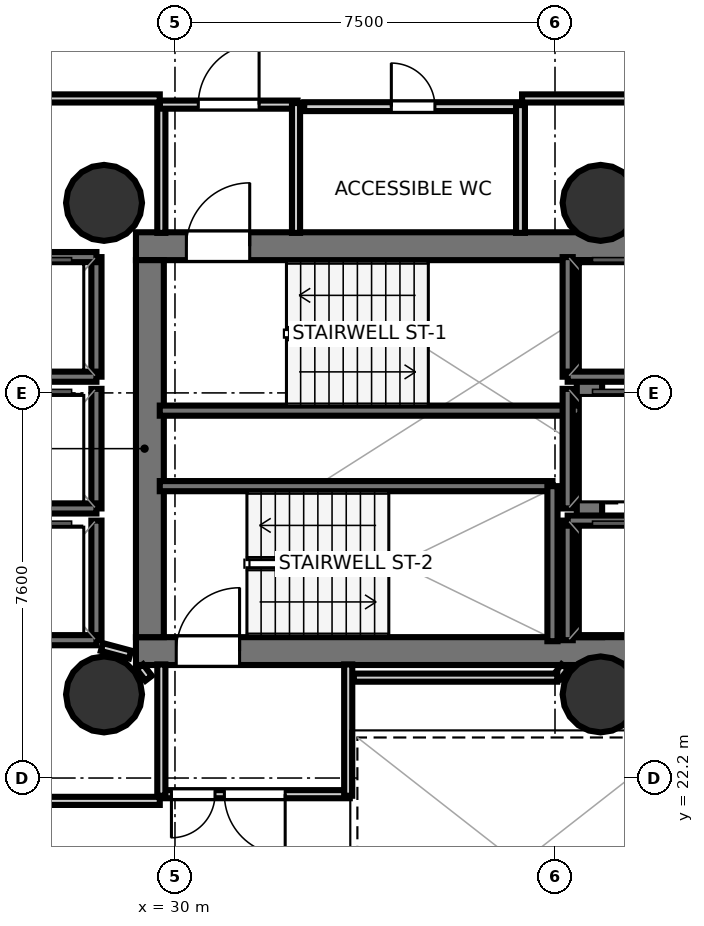
"""IFC4 building model, lengths in metres.
Left out: names, types, materials, properties, quantities, classifications, styles, units other than length and angle.
Written with IfcOpenShell. Run it as: python <this file> out.ifc"""

import sys

from ifc_helpers import new_model, si_unit, direction, frame, frame_2d, origin, origin_2d, place, context, subcontext, project, spatial, rectangle, hollow_circle, extrude, element, fill, save


model = new_model("IFC4")
c1 = context("Model", 3, precision=1e-05, world=origin(), true_north=direction((0.0, 1.0)))
c2 = subcontext(c1, "Body", "Model", "MODEL_VIEW")
j1 = project(units=[si_unit("LENGTHUNIT", "METRE"), si_unit("PLANEANGLEUNIT", "RADIAN")], contexts=[c1])
p1 = place(None, origin())
s1 = spatial("IfcSite", under=j1, at=p1, CompositionType="ELEMENT")
p2 = place(p1, origin())
s2 = spatial("IfcBuilding", under=s1, at=p2, CompositionType="ELEMENT")
p3 = place(p2, frame((0.0, 0.0, 134.8)))
s3 = spatial("IfcBuildingStorey", under=s2, at=p3, CompositionType="ELEMENT", Elevation=134.8)
p4 = place(p3, frame((29.23, 32.695, 0.0), z_axis=(0.0, 0.0, 1.0), x_axis=(1.0, 0.0, 0.0)))
e1 = element("IfcWall", 1, at=p4, inside=s3, PredefinedType="SHEAR", context=c2, shape_type="SweptSolid", body=[
    extrude(rectangle(XDim=10.62, YDim=0.55, at=frame_2d((5.31, 0.0))), origin(), (0.0, 0.0, 1.0), 3.4),
])
p5 = place(p4, frame((0.995, 0.0, 0.0)))
e2 = element("IfcOpeningElement", 2, at=p5, cuts=e1, PredefinedType="OPENING", context=c2, shape_type="SweptSolid", body=[
    extrude(rectangle(XDim=1.25, YDim=2.15, at=frame_2d((0.625, 1.075))), frame((0.0, 0.285, 0.0), z_axis=(0.0, -1.0, 0.0), x_axis=(1.0, 0.0, 0.0)), (0.0, 0.0, 1.0), 0.57),
])
p6 = place(p3, frame((29.23, 24.705, 0.0), z_axis=(0.0, 0.0, 1.0), x_axis=(1.0, 0.0, 0.0)))
e3 = element("IfcWall", 3, at=p6, inside=s3, PredefinedType="SHEAR", context=c2, shape_type="SweptSolid", body=[
    extrude(rectangle(XDim=10.62, YDim=0.55, at=frame_2d((5.31, 0.0))), origin(), (0.0, 0.0, 1.0), 3.4),
])
p7 = place(p6, frame((0.795, 0.0, 0.0)))
e4 = element("IfcOpeningElement", 4, at=p7, cuts=e3, PredefinedType="OPENING", context=c2, shape_type="SweptSolid", body=[
    extrude(rectangle(XDim=1.25, YDim=2.15, at=frame_2d((0.625, 1.075))), frame((0.0, 0.285, 0.0), z_axis=(0.0, -1.0, 0.0), x_axis=(1.0, 0.0, 0.0)), (0.0, 0.0, 1.0), 0.57),
])
p8 = place(p3, frame((29.505, 24.98, 0.0), z_axis=(0.0, 0.0, 1.0), x_axis=(0.0, 1.0, 0.0)))
e5 = element("IfcWall", 5, at=p8, inside=s3, PredefinedType="SHEAR", context=c2, shape_type="SweptSolid", body=[
    extrude(rectangle(XDim=7.44, YDim=0.55, at=frame_2d((3.72, 0.0))), origin(), (0.0, 0.0, 1.0), 3.4),
])
p9 = place(p3, frame((38.18, 24.98, 0.0), z_axis=(0.0, 0.0, 1.0), x_axis=(0.0, 1.0, 0.0)))
e6 = element("IfcWall", 6, at=p9, inside=s3, PredefinedType="SHEAR", context=c2, shape_type="SweptSolid", body=[
    extrude(rectangle(XDim=7.44, YDim=0.5, at=frame_2d((3.72, 0.0))), origin(), (0.0, 0.0, 1.0), 3.4),
])
for number, where, z_axis, x_axis in (
    (7, (28.6, 33.55, 0.0), (0.0, 0.0, 1.0), (1.0, 0.0, 0.0)),
    (8, (28.6, 23.85, 0.0), (0.0, 0.0, 1.0), (1.0, 0.0, 0.0)),
    (9, (38.4, 33.55, 0.0), (0.0, 0.0, 1.0), (1.0, 0.0, 0.0)),
    (10, (38.4, 23.85, 0.0), (0.0, 0.0, 1.0), (1.0, 0.0, 0.0)),
):
    element("IfcColumn", number, at=place(p3, frame(where, z_axis=z_axis, x_axis=x_axis)), inside=s3, PredefinedType="COLUMN", context=c2, shape_type="SweptSolid", body=[
        extrude(hollow_circle(Radius=0.75, WallThickness=0.036, at=origin_2d()), origin(), (0.0, 0.0, 1.0), 3.7),
    ])
p10 = place(p3, frame((29.7, 29.45, 0.0), z_axis=(0.0, 0.0, 1.0), x_axis=(1.0, 0.0, 0.0)))
e11 = element("IfcWall", 11, at=p10, inside=s3, PredefinedType="SOLIDWALL", context=c2, shape_type="SweptSolid", body=[
    extrude(rectangle(XDim=8.3, YDim=0.2, at=frame_2d((4.15, 0.0))), origin(), (0.0, 0.0, 1.0), 3.4),
])
p11 = place(p3, frame((29.7, 27.96, 0.0), z_axis=(0.0, 0.0, 1.0), x_axis=(1.0, 0.0, 0.0)))
e12 = element("IfcWall", 12, at=p11, inside=s3, PredefinedType="SOLIDWALL", context=c2, shape_type="SweptSolid", body=[
    extrude(rectangle(XDim=7.75, YDim=0.2, at=frame_2d((3.875, 0.0))), origin(), (0.0, 0.0, 1.0), 3.4),
])
p12 = place(p3, frame((37.45, 24.9, 0.0), z_axis=(0.0, 0.0, 1.0), x_axis=(0.0, 1.0, 0.0)))
e13 = element("IfcWall", 13, at=p12, inside=s3, PredefinedType="SOLIDWALL", context=c2, shape_type="SweptSolid", body=[
    extrude(rectangle(XDim=3.06, YDim=0.2, at=frame_2d((1.53, 0.0))), origin(), (0.0, 0.0, 1.0), 3.4),
])
p13 = place(p3, frame((37.75, 30.12, 0.0), z_axis=(0.0, 0.0, 1.0), x_axis=(0.0, 1.0, 0.0)))
e14 = element("IfcWall", 14, at=p13, inside=s3, PredefinedType="SOLIDWALL", context=c2, shape_type="SweptSolid", body=[
    extrude(rectangle(XDim=2.36, YDim=0.2, at=frame_2d((1.18, 0.0))), origin(), (0.0, 0.0, 1.0), 3.4),
])
p14 = place(p3, frame((37.75, 30.12, 0.0), z_axis=(0.0, 0.0, 1.0), x_axis=(1.0, 0.0, 0.0)))
e15 = element("IfcWall", 15, at=p14, inside=s3, PredefinedType="SOLIDWALL", context=c2, shape_type="SweptSolid", body=[
    extrude(rectangle(XDim=2.1, YDim=0.2, at=frame_2d((1.05, 0.0))), origin(), (0.0, 0.0, 1.0), 3.4),
])
p15 = place(p3, frame((37.75, 24.92, 0.0), z_axis=(0.0, 0.0, 1.0), x_axis=(0.0, 1.0, 0.0)))
e16 = element("IfcWall", 16, at=p15, inside=s3, PredefinedType="SOLIDWALL", context=c2, shape_type="SweptSolid", body=[
    extrude(rectangle(XDim=2.36, YDim=0.2, at=frame_2d((1.18, 0.0))), origin(), (0.0, 0.0, 1.0), 3.4),
])
p16 = place(p3, frame((37.75, 27.28, 0.0), z_axis=(0.0, 0.0, 1.0), x_axis=(1.0, 0.0, 0.0)))
e17 = element("IfcWall", 17, at=p16, inside=s3, PredefinedType="SOLIDWALL", context=c2, shape_type="SweptSolid", body=[
    extrude(rectangle(XDim=2.1, YDim=0.2, at=frame_2d((1.05, 0.0))), origin(), (0.0, 0.0, 1.0), 3.4),
])
p17 = place(p3, frame((28.45, 30.12, 0.0), z_axis=(0.0, 0.0, 1.0), x_axis=(0.0, 1.0, 0.0)))
e18 = element("IfcWall", 18, at=p17, inside=s3, PredefinedType="SOLIDWALL", context=c2, shape_type="SweptSolid", body=[
    extrude(rectangle(XDim=2.36, YDim=0.2, at=frame_2d((1.18, 0.0))), origin(), (0.0, 0.0, 1.0), 3.4),
])
for number, where, z_axis, x_axis in (
    (19, (26.35, 32.48, 0.0), (0.0, 0.0, 1.0), (1.0, 0.0, 0.0)),
    (20, (26.35, 30.12, 0.0), (0.0, 0.0, 1.0), (1.0, 0.0, 0.0)),
):
    element("IfcWall", number, at=place(p3, frame(where, z_axis=z_axis, x_axis=x_axis)), inside=s3, PredefinedType="SOLIDWALL", context=c2, shape_type="SweptSolid", body=[
        extrude(rectangle(XDim=2.1, YDim=0.2, at=frame_2d((1.05, 0.0))), origin(), (0.0, 0.0, 1.0), 3.4),
    ])
p18 = place(p3, frame((28.45, 27.52, 0.0), z_axis=(0.0, 0.0, 1.0), x_axis=(0.0, 1.0, 0.0)))
e21 = element("IfcWall", 21, at=p18, inside=s3, PredefinedType="SOLIDWALL", context=c2, shape_type="SweptSolid", body=[
    extrude(rectangle(XDim=2.36, YDim=0.2, at=frame_2d((1.18, 0.0))), origin(), (0.0, 0.0, 1.0), 3.4),
])
p19 = place(p3, frame((26.35, 27.52, 0.0), z_axis=(0.0, 0.0, 1.0), x_axis=(1.0, 0.0, 0.0)))
e22 = element("IfcWall", 22, at=p19, inside=s3, PredefinedType="SOLIDWALL", context=c2, shape_type="SweptSolid", body=[
    extrude(rectangle(XDim=2.1, YDim=0.2, at=frame_2d((1.05, 0.0))), origin(), (0.0, 0.0, 1.0), 3.4),
])
p20 = place(p3, frame((28.45, 24.92, 0.0), z_axis=(0.0, 0.0, 1.0), x_axis=(0.0, 1.0, 0.0)))
e23 = element("IfcWall", 23, at=p20, inside=s3, PredefinedType="SOLIDWALL", context=c2, shape_type="SweptSolid", body=[
    extrude(rectangle(XDim=2.36, YDim=0.2, at=frame_2d((1.18, 0.0))), origin(), (0.0, 0.0, 1.0), 3.4),
])
p21 = place(p3, frame((26.35, 24.92, 0.0), z_axis=(0.0, 0.0, 1.0), x_axis=(1.0, 0.0, 0.0)))
e24 = element("IfcWall", 24, at=p21, inside=s3, PredefinedType="SOLIDWALL", context=c2, shape_type="SweptSolid", body=[
    extrude(rectangle(XDim=2.1, YDim=0.2, at=frame_2d((1.05, 0.0))), origin(), (0.0, 0.0, 1.0), 3.4),
])
p22 = place(p3, frame((37.75, 27.52, 0.0), z_axis=(0.0, 0.0, 1.0), x_axis=(0.0, 1.0, 0.0)))
e25 = element("IfcWall", 25, at=p22, inside=s3, PredefinedType="SOLIDWALL", context=c2, shape_type="SweptSolid", body=[
    extrude(rectangle(XDim=2.36, YDim=0.2, at=frame_2d((1.18, 0.0))), origin(), (0.0, 0.0, 1.0), 3.4),
])
p23 = place(p3, frame((29.731, 32.958, 0.0), z_axis=(0.0, 0.0, 1.0), x_axis=(0.0, 1.0, 0.0)))
e26 = element("IfcWall", 26, at=p23, inside=s3, PredefinedType="PARTITIONING", context=c2, shape_type="SweptSolid", body=[
    extrude(rectangle(XDim=2.562, YDim=0.16, at=frame_2d((1.281, 0.0))), origin(), (0.0, 0.0, 1.0), 2.72),
])
p24 = place(p3, frame((29.7, 35.489, 0.0), z_axis=(0.0, 0.0, 1.0), x_axis=(1.0, 0.0, 0.0)))
e27 = element("IfcWall", 27, at=p24, inside=s3, PredefinedType="PARTITIONING", context=c2, shape_type="SweptSolid", body=[
    extrude(rectangle(XDim=2.72, YDim=0.16, at=frame_2d((1.36, 0.0))), origin(), (0.0, 0.0, 1.0), 2.72),
])
p25 = place(p24, frame((0.76, 0.0, 0.0)))
e28 = element("IfcOpeningElement", 28, at=p25, cuts=e27, PredefinedType="OPENING", context=c2, shape_type="SweptSolid", body=[
    extrude(rectangle(XDim=1.2, YDim=2.15, at=frame_2d((0.6, 1.075))), frame((0.0, 0.09, 0.0), z_axis=(0.0, -1.0, 0.0), x_axis=(1.0, 0.0, 0.0)), (0.0, 0.0, 1.0), 0.18),
])
p26 = place(p3, frame((32.389, 35.52, 0.0), z_axis=(0.0, 0.0, 1.0), x_axis=(0.0, -1.0, 0.0)))
e29 = element("IfcWall", 29, at=p26, inside=s3, PredefinedType="PARTITIONING", context=c2, shape_type="SweptSolid", body=[
    extrude(rectangle(XDim=2.562, YDim=0.16, at=frame_2d((1.281, 0.0))), origin(), (0.0, 0.0, 1.0), 2.72),
])
p27 = place(p3, frame((33.45, 21.881, 0.0), z_axis=(0.0, 0.0, 1.0), x_axis=(-1.0, 0.0, 0.0)))
e30 = element("IfcWall", 30, at=p27, inside=s3, PredefinedType="PARTITIONING", context=c2, shape_type="SweptSolid", body=[
    extrude(rectangle(XDim=3.75, YDim=0.16, at=frame_2d((1.875, 0.0))), origin(), (0.0, 0.0, 1.0), 2.72),
])
p28 = place(p27, frame((1.275, 0.0, 0.0)))
e31 = element("IfcOpeningElement", 31, at=p28, cuts=e30, PredefinedType="OPENING", context=c2, shape_type="SweptSolid", body=[
    extrude(rectangle(XDim=1.2, YDim=2.15, at=frame_2d((0.6, 1.075))), frame((0.0, 0.09, 0.0), z_axis=(0.0, -1.0, 0.0), x_axis=(1.0, 0.0, 0.0)), (0.0, 0.0, 1.0), 0.18),
])
p29 = place(p27, frame((2.66, 0.0, 0.0)))
e32 = element("IfcOpeningElement", 32, at=p29, cuts=e30, PredefinedType="OPENING", context=c2, shape_type="SweptSolid", body=[
    extrude(rectangle(XDim=0.86, YDim=2.05, at=frame_2d((0.43, 1.025))), frame((0.0, 0.09, 0.0), z_axis=(0.0, -1.0, 0.0), x_axis=(1.0, 0.0, 0.0)), (0.0, 0.0, 1.0), 0.18),
])
for number, where, z_axis, x_axis in (
    (33, (29.731, 21.85, 0.0), (0.0, 0.0, 1.0), (0.0, 1.0, 0.0)),
    (34, (33.419, 24.442, 0.0), (0.0, 0.0, 1.0), (0.0, -1.0, 0.0)),
):
    element("IfcWall", number, at=place(p3, frame(where, z_axis=z_axis, x_axis=x_axis)), inside=s3, PredefinedType="PARTITIONING", context=c2, shape_type="SweptSolid", body=[
        extrude(rectangle(XDim=2.592, YDim=0.16, at=frame_2d((1.296, 0.0))), origin(), (0.0, 0.0, 1.0), 2.72),
    ])
p30 = place(p3, frame((32.55, 35.449, 0.0), z_axis=(0.0, 0.0, 1.0), x_axis=(1.0, 0.0, 0.0)))
e35 = element("IfcWall", 35, at=p30, inside=s3, PredefinedType="PLUMBINGWALL", context=c2, shape_type="SweptSolid", body=[
    extrude(rectangle(XDim=4.3, YDim=0.175, at=frame_2d((2.15, 0.0))), origin(), (0.0, 0.0, 1.0), 2.72),
])
p31 = place(p30, frame((1.72, 0.0, 0.0)))
e36 = element("IfcOpeningElement", 36, at=p31, cuts=e35, PredefinedType="OPENING", context=c2, shape_type="SweptSolid", body=[
    extrude(rectangle(XDim=0.86, YDim=2.05, at=frame_2d((0.43, 1.025))), frame((0.0, 0.097, 0.0), z_axis=(0.0, -1.0, 0.0), x_axis=(1.0, 0.0, 0.0)), (0.0, 0.0, 1.0), 0.195),
])
p32 = place(p3, frame((36.819, 35.48, 0.0), z_axis=(0.0, 0.0, 1.0), x_axis=(0.0, -1.0, 0.0)))
e37 = element("IfcWall", 37, at=p32, inside=s3, PredefinedType="PLUMBINGWALL", context=c2, shape_type="SweptSolid", body=[
    extrude(rectangle(XDim=2.522, YDim=0.175, at=frame_2d((1.261, 0.0))), origin(), (0.0, 0.0, 1.0), 2.72),
])
p33 = place(p3, frame((29.48, 24.169, 0.0), z_axis=(0.0, 0.0, 1.0), x_axis=(-0.607608252226, 0.794236873878, 0.0)))
e38 = element("IfcWall", 38, at=p33, inside=s3, PredefinedType="PARTITIONING", context=c2, shape_type="SweptSolid", body=[
    extrude(rectangle(XDim=0.286, YDim=0.16, at=frame_2d((0.143, 0.0))), origin(), (0.0, 0.0, 1.0), 2.72),
])
p34 = place(p3, frame((29.114, 24.637, 0.0), z_axis=(0.0, 0.0, 1.0), x_axis=(-0.966199685486, 0.257794817183, 0.0)))
e39 = element("IfcWall", 39, at=p34, inside=s3, PredefinedType="PARTITIONING", context=c2, shape_type="SweptSolid", body=[
    extrude(rectangle(XDim=0.575, YDim=0.16, at=frame_2d((0.288, 0.0))), origin(), (0.0, 0.0, 1.0), 2.72),
])
p35 = place(p3, frame((37.694, 24.396, 0.0), z_axis=(0.0, 0.0, 1.0), x_axis=(-0.607118658061, -0.794611184815, 0.0)))
e40 = element("IfcWall", 40, at=p35, inside=s3, PredefinedType="PARTITIONING", context=c2, shape_type="SweptSolid", body=[
    extrude(rectangle(XDim=0.246, YDim=0.16, at=frame_2d((0.123, 0.0))), origin(), (0.0, 0.0, 1.0), 2.72),
])
p36 = place(p3, frame((37.545, 24.181, 0.0), z_axis=(0.0, 0.0, 1.0), x_axis=(-1.0, 0.0, 0.0)))
e41 = element("IfcWall", 41, at=p36, inside=s3, PredefinedType="PARTITIONING", context=c2, shape_type="SweptSolid", body=[
    extrude(rectangle(XDim=4.015, YDim=0.16, at=frame_2d((2.007, 0.0))), origin(), (0.0, 0.0, 1.0), 2.72),
])
p37 = place(p3, frame((39.818, 35.611, 0.0), z_axis=(0.0, 0.0, 1.0), x_axis=(-1.0, 0.0, 0.0)))
e42 = element("IfcWall", 42, at=p37, inside=s3, PredefinedType="PARTITIONING", context=c2, shape_type="SweptSolid", body=[
    extrude(rectangle(XDim=2.968, YDim=0.16, at=frame_2d((1.484, 0.0))), origin(), (0.0, 0.0, 1.0), 2.72),
])
for number, where, z_axis, x_axis in (
    (43, (29.7, 35.611, 0.0), (0.0, 0.0, 1.0), (-1.0, 0.0, 0.0)),
    (44, (26.42, 21.749, 0.0), (0.0, 0.0, 1.0), (1.0, 0.0, 0.0)),
):
    element("IfcWall", number, at=place(p3, frame(where, z_axis=z_axis, x_axis=x_axis)), inside=s3, PredefinedType="PARTITIONING", context=c2, shape_type="SweptSolid", body=[
        extrude(rectangle(XDim=3.28, YDim=0.16, at=frame_2d((1.64, 0.0))), origin(), (0.0, 0.0, 1.0), 2.72),
    ])
p38 = place(p5, origin())
e45 = element("IfcDoor", 45, at=p38, inside=s3, OperationType="SINGLE_SWING_RIGHT", PredefinedType="DOOR", context=c2, shape_type="SweptSolid", body=[
    extrude(rectangle(XDim=1.25, YDim=2.15, at=frame_2d((0.625, 1.075))), frame((0.0, 0.025, 0.0), z_axis=(0.0, -1.0, 0.0), x_axis=(1.0, 0.0, 0.0)), (0.0, 0.0, 1.0), 0.05),
])
fill(e2, e45)
p39 = place(p7, origin())
e46 = element("IfcDoor", 46, at=p39, inside=s3, OperationType="SINGLE_SWING_RIGHT", PredefinedType="DOOR", context=c2, shape_type="SweptSolid", body=[
    extrude(rectangle(XDim=1.25, YDim=2.15, at=frame_2d((0.625, 1.075))), frame((0.0, 0.025, 0.0), z_axis=(0.0, -1.0, 0.0), x_axis=(1.0, 0.0, 0.0)), (0.0, 0.0, 1.0), 0.05),
])
fill(e4, e46)
p40 = place(p25, origin())
e47 = element("IfcDoor", 47, at=p40, inside=s3, OperationType="SINGLE_SWING_RIGHT", PredefinedType="DOOR", context=c2, shape_type="SweptSolid", body=[
    extrude(rectangle(XDim=1.2, YDim=2.15, at=frame_2d((0.6, 1.075))), frame((0.0, 0.025, 0.0), z_axis=(0.0, -1.0, 0.0), x_axis=(1.0, 0.0, 0.0)), (0.0, 0.0, 1.0), 0.05),
])
fill(e28, e47)
p41 = place(p28, origin())
e48 = element("IfcDoor", 48, at=p41, inside=s3, OperationType="SINGLE_SWING_LEFT", PredefinedType="DOOR", context=c2, shape_type="SweptSolid", body=[
    extrude(rectangle(XDim=1.2, YDim=2.15, at=frame_2d((0.6, 1.075))), frame((0.0, 0.025, 0.0), z_axis=(0.0, -1.0, 0.0), x_axis=(1.0, 0.0, 0.0)), (0.0, 0.0, 1.0), 0.05),
])
fill(e31, e48)
p42 = place(p31, origin())
e49 = element("IfcDoor", 49, at=p42, inside=s3, OperationType="SINGLE_SWING_LEFT", PredefinedType="DOOR", context=c2, shape_type="SweptSolid", body=[
    extrude(rectangle(XDim=0.86, YDim=2.05, at=frame_2d((0.43, 1.025))), frame((0.0, 0.025, 0.0), z_axis=(0.0, -1.0, 0.0), x_axis=(1.0, 0.0, 0.0)), (0.0, 0.0, 1.0), 0.05),
])
fill(e36, e49)
p43 = place(p29, origin())
e50 = element("IfcDoor", 50, at=p43, inside=s3, OperationType="SINGLE_SWING_RIGHT", PredefinedType="DOOR", context=c2, shape_type="SweptSolid", body=[
    extrude(rectangle(XDim=0.86, YDim=2.05, at=frame_2d((0.43, 1.025))), frame((0.0, 0.025, 0.0), z_axis=(0.0, -1.0, 0.0), x_axis=(1.0, 0.0, 0.0)), (0.0, 0.0, 1.0), 0.05),
])
fill(e32, e50)
save(model, sys.argv[1])
